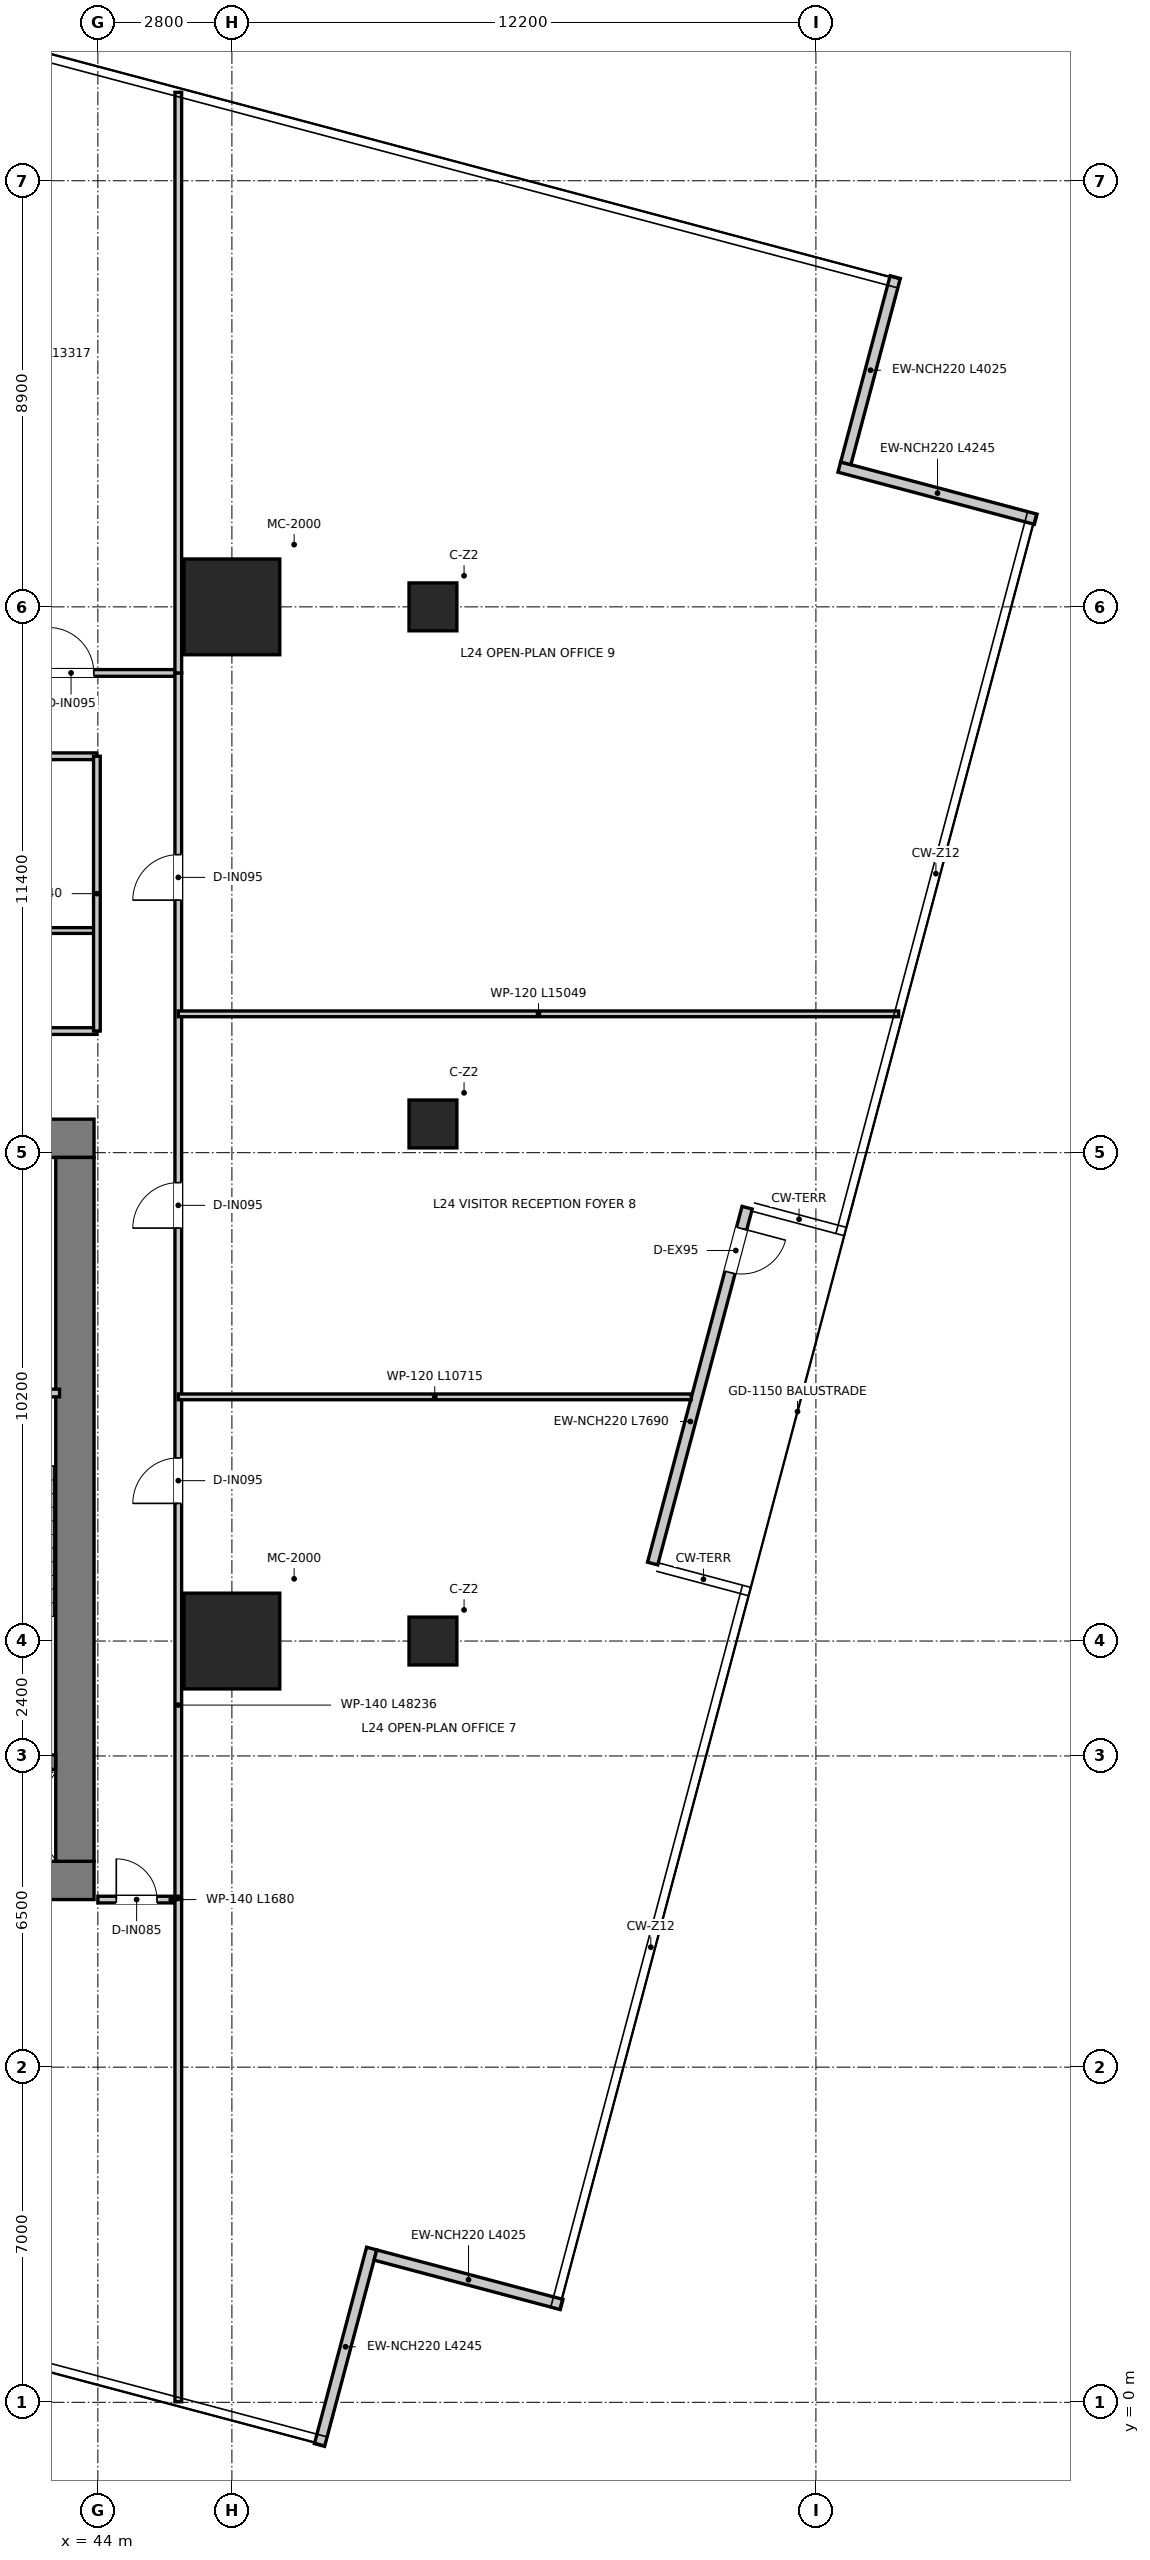
"""IFC4 building model, lengths in metres.
Left out: names, types, materials, properties, quantities, classifications, styles, units other than length and angle.
Written with IfcOpenShell. Run it as: python <this file> out.ifc"""

import sys

from ifc_helpers import new_model, si_unit, direction, frame, frame_2d, origin, origin_2d, place, context, subcontext, project, spatial, rectangle, extrude, source, transform, mapped, element, fill, save


model = new_model("IFC4")
c1 = context("Model", 3, precision=1e-05, world=origin(), true_north=direction((0.0, 1.0)))
c2 = subcontext(c1, "Body", "Model", "MODEL_VIEW")
j1 = project(units=[si_unit("LENGTHUNIT", "METRE"), si_unit("PLANEANGLEUNIT", "RADIAN")], contexts=[c1])
p1 = place(None, origin())
s1 = spatial("IfcSite", under=j1, at=p1, CompositionType="ELEMENT")
p2 = place(p1, origin())
s2 = spatial("IfcBuilding", under=s1, at=p2, CompositionType="ELEMENT")
p3 = place(p2, frame((0.0, 0.0, 101.9)))
s3 = spatial("IfcBuildingStorey", under=s2, at=p3, CompositionType="ELEMENT", Elevation=101.9)
p4 = place(p3, frame((28.08, 10.9, 0.0), z_axis=(0.0, 0.0, 1.0), x_axis=(1.0, 0.0, 0.0)))
e1 = element("IfcWall", 1, at=p4, inside=s3, PredefinedType="SHEAR", context=c2, shape_type="SweptSolid", body=[
    extrude(rectangle(XDim=15.84, YDim=0.8, at=frame_2d((7.92, 0.0))), origin(), (0.0, 0.0, 1.0), 3.95),
])
p5 = place(p3, frame((28.08, 26.4, 0.0), z_axis=(0.0, 0.0, 1.0), x_axis=(1.0, 0.0, 0.0)))
e2 = element("IfcWall", 2, at=p5, inside=s3, PredefinedType="SHEAR", context=c2, shape_type="SweptSolid", body=[
    extrude(rectangle(XDim=15.84, YDim=0.8, at=frame_2d((7.92, 0.0))), origin(), (0.0, 0.0, 1.0), 3.95),
])
p6 = place(p5, frame((7.22, 0.0, 0.0)))
e3 = element("IfcOpeningElement", 3, at=p6, cuts=e2, PredefinedType="OPENING", context=c2, shape_type="SweptSolid", body=[
    extrude(rectangle(XDim=1.4, YDim=2.2, at=frame_2d((0.7, 1.1))), frame((0.0, 0.41, 0.0), z_axis=(0.0, -1.0, 0.0), x_axis=(1.0, 0.0, 0.0)), (0.0, 0.0, 1.0), 0.82),
])
p7 = place(p5, frame((1.775, 0.0, 0.0)))
e4 = element("IfcOpeningElement", 4, at=p7, cuts=e2, PredefinedType="OPENING", context=c2, shape_type="SweptSolid", body=[
    extrude(rectangle(XDim=1.05, YDim=2.1, at=frame_2d((0.525, 1.05))), frame((0.0, 0.41, 0.0), z_axis=(0.0, -1.0, 0.0), x_axis=(1.0, 0.0, 0.0)), (0.0, 0.0, 1.0), 0.82),
])
p8 = place(p5, frame((13.015, 0.0, 0.0)))
e5 = element("IfcOpeningElement", 5, at=p8, cuts=e2, PredefinedType="OPENING", context=c2, shape_type="SweptSolid", body=[
    extrude(rectangle(XDim=1.05, YDim=2.1, at=frame_2d((0.525, 1.05))), frame((0.0, 0.41, 0.0), z_axis=(0.0, -1.0, 0.0), x_axis=(1.0, 0.0, 0.0)), (0.0, 0.0, 1.0), 0.82),
])
p9 = place(p3, frame((43.52, 11.3, 0.0), z_axis=(0.0, 0.0, 1.0), x_axis=(0.0, 1.0, 0.0)))
e6 = element("IfcWall", 6, at=p9, inside=s3, PredefinedType="SHEAR", context=c2, shape_type="SweptSolid", body=[
    extrude(rectangle(XDim=14.7, YDim=0.8, at=frame_2d((7.35, 0.0))), origin(), (0.0, 0.0, 1.0), 3.95),
])
p10 = place(p3, frame((40.02, 13.37, 0.0), z_axis=(0.0, 0.0, 1.0), x_axis=(1.0, 0.0, 0.0)))
e7 = element("IfcWall", 7, at=p10, inside=s3, PredefinedType="SHEAR", context=c2, shape_type="SweptSolid", body=[
    extrude(rectangle(XDim=3.1, YDim=0.3, at=frame_2d((1.55, 0.0))), origin(), (0.0, 0.0, 1.0), 3.95),
])
m1 = source(origin(), c2, "Body", "SweptSolid", [
    extrude(rectangle(XDim=2.0, YDim=2.0, at=origin_2d()), origin(), (0.0, 0.0, 1.0), 3.95),
])
for number, where, z_axis, x_axis in (
    (8, (46.8, 15.9, 0.0), (0.0, 0.0, 1.0), (1.0, 0.0, 0.0)),
    (9, (46.8, 37.5, 0.0), (0.0, 0.0, 1.0), (1.0, 0.0, 0.0)),
):
    element("IfcColumn", number, at=place(p3, frame(where, z_axis=z_axis, x_axis=x_axis)), inside=s3, PredefinedType="USERDEFINED", context=c2, shape_type="MappedRepresentation", body=[
        mapped(m1, transform((0.0, 0.0, 0.0), x_axis=(1.0, 0.0, 0.0), y_axis=(0.0, 1.0, 0.0), z_axis=(0.0, 0.0, 1.0), scale=1.0)),
    ])
m2 = source(origin(), c2, "Body", "SweptSolid", [
    extrude(rectangle(XDim=1.0, YDim=1.0, at=origin_2d()), origin(), (0.0, 0.0, 1.0), 3.95),
])
for number, where, z_axis, x_axis in (
    (10, (51.0, 37.5, 0.0), (0.0, 0.0, 1.0), (1.0, 0.0, 0.0)),
    (11, (51.0, 26.7, 0.0), (0.0, 0.0, 1.0), (1.0, 0.0, 0.0)),
    (12, (51.0, 15.9, 0.0), (0.0, 0.0, 1.0), (1.0, 0.0, 0.0)),
):
    element("IfcColumn", number, at=place(p3, frame(where, z_axis=z_axis, x_axis=x_axis)), inside=s3, PredefinedType="COLUMN", context=c2, shape_type="MappedRepresentation", body=[
        mapped(m2, transform((0.0, 0.0, 0.0), x_axis=(1.0, 0.0, 0.0), y_axis=(0.0, 1.0, 0.0), z_axis=(0.0, 0.0, 1.0), scale=1.0)),
    ])
p11 = place(p3, frame((48.63, -0.892, 0.0), z_axis=(0.0, 0.0, 1.0), x_axis=(0.256692391399, 0.966493153725, 0.0)))
e13 = element("IfcWall", 13, at=p11, inside=s3, PredefinedType="ELEMENTEDWALL", context=c2, shape_type="SweptSolid", body=[
    extrude(rectangle(XDim=4.245, YDim=0.22, at=frame_2d((2.123, 0.0))), origin(), (0.0, 0.0, 1.0), 3.67),
])
p12 = place(p3, frame((49.798, 3.076, 0.0), z_axis=(0.0, 0.0, 1.0), x_axis=(0.966492181189, -0.256696053144, 0.0)))
e14 = element("IfcWall", 14, at=p12, inside=s3, PredefinedType="ELEMENTEDWALL", context=c2, shape_type="SweptSolid", body=[
    extrude(rectangle(XDim=4.025, YDim=0.22, at=frame_2d((2.012, 0.0))), origin(), (0.0, 0.0, 1.0), 3.67),
])
p13 = place(p3, frame((57.563, 24.951, 0.0), z_axis=(0.0, 0.0, 1.0), x_axis=(-0.256717978083, -0.966486357756, 0.0)))
e15 = element("IfcWall", 15, at=p13, inside=s3, PredefinedType="ELEMENTEDWALL", context=c2, shape_type="SweptSolid", body=[
    extrude(rectangle(XDim=7.69, YDim=0.22, at=frame_2d((3.845, 0.0))), origin(), (0.0, 0.0, 1.0), 3.67),
])
p14 = place(p13, frame((0.45, 0.0, 0.0)))
e16 = element("IfcOpeningElement", 16, at=p14, cuts=e15, PredefinedType="OPENING", context=c2, shape_type="SweptSolid", body=[
    extrude(rectangle(XDim=0.95, YDim=2.1, at=frame_2d((0.475, 1.05))), frame((0.0, 0.12, 0.0), z_axis=(0.0, -1.0, 0.0), x_axis=(1.0, 0.0, 0.0)), (0.0, 0.0, 1.0), 0.24),
])
p15 = place(p3, frame((63.592, 39.33, 0.0), z_axis=(0.0, 0.0, 1.0), x_axis=(-0.966482674278, 0.256731845164, 0.0)))
e17 = element("IfcWall", 17, at=p15, inside=s3, PredefinedType="ELEMENTEDWALL", context=c2, shape_type="SweptSolid", body=[
    extrude(rectangle(XDim=4.245, YDim=0.22, at=frame_2d((2.123, 0.0))), origin(), (0.0, 0.0, 1.0), 3.67),
])
p16 = place(p3, frame((59.624, 40.498, 0.0), z_axis=(0.0, 0.0, 1.0), x_axis=(0.256696053144, 0.966492181189, 0.0)))
e18 = element("IfcWall", 18, at=p16, inside=s3, PredefinedType="ELEMENTEDWALL", context=c2, shape_type="SweptSolid", body=[
    extrude(rectangle(XDim=4.025, YDim=0.22, at=frame_2d((2.012, 0.0))), origin(), (0.0, 0.0, 1.0), 3.67),
])
p17 = place(p3, frame((40.04, 21.08, 0.0), z_axis=(0.0, 0.0, 1.0), x_axis=(1.0, 0.0, 0.0)))
e19 = element("IfcWall", 19, at=p17, inside=s3, PredefinedType="PARTITIONING", context=c2, shape_type="SweptSolid", body=[
    extrude(rectangle(XDim=3.16, YDim=0.16, at=frame_2d((1.58, 0.0))), origin(), (0.0, 0.0, 1.0), 3.67),
])
p18 = place(p17, frame((1.055, 0.0, 0.0)))
e20 = element("IfcOpeningElement", 20, at=p18, cuts=e19, PredefinedType="OPENING", context=c2, shape_type="SweptSolid", body=[
    extrude(rectangle(XDim=1.05, YDim=2.1, at=frame_2d((0.525, 1.05))), frame((0.0, 0.09, 0.0), z_axis=(0.0, -1.0, 0.0), x_axis=(1.0, 0.0, 0.0)), (0.0, 0.0, 1.0), 0.18),
])
p19 = place(p3, frame((28.02, 28.64, 0.0), z_axis=(0.0, 0.0, 1.0), x_axis=(1.0, 0.0, 0.0)))
e21 = element("IfcWall", 21, at=p19, inside=s3, PredefinedType="PARTITIONING", context=c2, shape_type="SweptSolid", body=[
    extrude(rectangle(XDim=15.96, YDim=0.14, at=frame_2d((7.98, 0.0))), origin(), (0.0, 0.0, 1.0), 3.08),
])
p20 = place(p19, frame((7.455, 0.0, 0.0)))
e22 = element("IfcOpeningElement", 22, at=p20, cuts=e21, PredefinedType="OPENING", context=c2, shape_type="SweptSolid", body=[
    extrude(rectangle(XDim=1.05, YDim=2.15, at=frame_2d((0.525, 1.075))), frame((0.0, 0.08, 0.0), z_axis=(0.0, -1.0, 0.0), x_axis=(1.0, 0.0, 0.0)), (0.0, 0.0, 1.0), 0.16),
])
p21 = place(p3, frame((28.02, 30.74, 0.0), z_axis=(0.0, 0.0, 1.0), x_axis=(1.0, 0.0, 0.0)))
e23 = element("IfcWall", 23, at=p21, inside=s3, PredefinedType="PARTITIONING", context=c2, shape_type="SweptSolid", body=[
    extrude(rectangle(XDim=15.96, YDim=0.12, at=frame_2d((7.98, 0.0))), origin(), (0.0, 0.0, 1.0), 3.08),
])
p22 = place(p3, frame((28.02, 34.38, 0.0), z_axis=(0.0, 0.0, 1.0), x_axis=(1.0, 0.0, 0.0)))
e24 = element("IfcWall", 24, at=p22, inside=s3, PredefinedType="PARTITIONING", context=c2, shape_type="SweptSolid", body=[
    extrude(rectangle(XDim=15.96, YDim=0.14, at=frame_2d((7.98, 0.0))), origin(), (0.0, 0.0, 1.0), 3.08),
])
p23 = place(p22, frame((1.13, 0.0, 0.0)))
e25 = element("IfcOpeningElement", 25, at=p23, cuts=e24, PredefinedType="OPENING", context=c2, shape_type="SweptSolid", body=[
    extrude(rectangle(XDim=0.9, YDim=2.1, at=frame_2d((0.45, 1.05))), frame((0.0, 0.08, 0.0), z_axis=(0.0, -1.0, 0.0), x_axis=(1.0, 0.0, 0.0)), (0.0, 0.0, 1.0), 0.16),
])
p24 = place(p22, frame((4.33, 0.0, 0.0)))
e26 = element("IfcOpeningElement", 26, at=p24, cuts=e24, PredefinedType="OPENING", context=c2, shape_type="SweptSolid", body=[
    extrude(rectangle(XDim=0.9, YDim=2.1, at=frame_2d((0.45, 1.05))), frame((0.0, 0.08, 0.0), z_axis=(0.0, -1.0, 0.0), x_axis=(1.0, 0.0, 0.0)), (0.0, 0.0, 1.0), 0.16),
])
p25 = place(p22, frame((7.355, 0.0, 0.0)))
e27 = element("IfcOpeningElement", 27, at=p25, cuts=e24, PredefinedType="OPENING", context=c2, shape_type="SweptSolid", body=[
    extrude(rectangle(XDim=0.95, YDim=2.1, at=frame_2d((0.475, 1.05))), frame((0.0, 0.08, 0.0), z_axis=(0.0, -1.0, 0.0), x_axis=(1.0, 0.0, 0.0)), (0.0, 0.0, 1.0), 0.16),
])
p26 = place(p22, frame((12.23, 0.0, 0.0)))
e28 = element("IfcOpeningElement", 28, at=p26, cuts=e24, PredefinedType="OPENING", context=c2, shape_type="SweptSolid", body=[
    extrude(rectangle(XDim=0.95, YDim=2.1, at=frame_2d((0.475, 1.05))), frame((0.0, 0.08, 0.0), z_axis=(0.0, -1.0, 0.0), x_axis=(1.0, 0.0, 0.0)), (0.0, 0.0, 1.0), 0.16),
])
p27 = place(p3, frame((43.98, 28.64, 0.0), z_axis=(0.0, 0.0, 1.0), x_axis=(0.0, 1.0, 0.0)))
e29 = element("IfcWall", 29, at=p27, inside=s3, PredefinedType="PARTITIONING", context=c2, shape_type="SweptSolid", body=[
    extrude(rectangle(XDim=5.74, YDim=0.14, at=frame_2d((2.87, 0.0))), origin(), (0.0, 0.0, 1.0), 3.27),
])
p28 = place(p3, frame((26.32, 36.12, 0.0), z_axis=(0.0, 0.0, 1.0), x_axis=(1.0, 0.0, 0.0)))
e30 = element("IfcWall", 30, at=p28, inside=s3, PredefinedType="PARTITIONING", context=c2, shape_type="SweptSolid", body=[
    extrude(rectangle(XDim=19.36, YDim=0.14, at=frame_2d((9.68, 0.0))), origin(), (0.0, 0.0, 1.0), 3.08),
])
p29 = place(p28, frame((1.265, 0.0, 0.0)))
e31 = element("IfcOpeningElement", 31, at=p29, cuts=e30, PredefinedType="OPENING", context=c2, shape_type="SweptSolid", body=[
    extrude(rectangle(XDim=0.95, YDim=2.1, at=frame_2d((0.475, 1.05))), frame((0.0, 0.08, 0.0), z_axis=(0.0, -1.0, 0.0), x_axis=(1.0, 0.0, 0.0)), (0.0, 0.0, 1.0), 0.16),
])
p30 = place(p28, frame((5.855, 0.0, 0.0)))
e32 = element("IfcOpeningElement", 32, at=p30, cuts=e30, PredefinedType="OPENING", context=c2, shape_type="SweptSolid", body=[
    extrude(rectangle(XDim=0.95, YDim=2.1, at=frame_2d((0.475, 1.05))), frame((0.0, 0.08, 0.0), z_axis=(0.0, -1.0, 0.0), x_axis=(1.0, 0.0, 0.0)), (0.0, 0.0, 1.0), 0.16),
])
p31 = place(p28, frame((11.555, 0.0, 0.0)))
e33 = element("IfcOpeningElement", 33, at=p31, cuts=e30, PredefinedType="OPENING", context=c2, shape_type="SweptSolid", body=[
    extrude(rectangle(XDim=0.95, YDim=2.1, at=frame_2d((0.475, 1.05))), frame((0.0, 0.08, 0.0), z_axis=(0.0, -1.0, 0.0), x_axis=(1.0, 0.0, 0.0)), (0.0, 0.0, 1.0), 0.16),
])
p32 = place(p28, frame((16.645, 0.0, 0.0)))
e34 = element("IfcOpeningElement", 34, at=p32, cuts=e30, PredefinedType="OPENING", context=c2, shape_type="SweptSolid", body=[
    extrude(rectangle(XDim=0.95, YDim=2.1, at=frame_2d((0.475, 1.05))), frame((0.0, 0.08, 0.0), z_axis=(0.0, -1.0, 0.0), x_axis=(1.0, 0.0, 0.0)), (0.0, 0.0, 1.0), 0.16),
])
p33 = place(p3, frame((45.68, 10.5, 0.0), z_axis=(0.0, 0.0, 1.0), x_axis=(0.0, 1.0, 0.0)))
e35 = element("IfcWall", 35, at=p33, inside=s3, PredefinedType="PARTITIONING", context=c2, shape_type="SweptSolid", body=[
    extrude(rectangle(XDim=25.62, YDim=0.14, at=frame_2d((12.81, 0.0))), origin(), (0.0, 0.0, 1.0), 2.97),
])
p34 = place(p33, frame((8.275, 0.0, 0.0)))
e36 = element("IfcOpeningElement", 36, at=p34, cuts=e35, PredefinedType="OPENING", context=c2, shape_type="SweptSolid", body=[
    extrude(rectangle(XDim=0.95, YDim=2.1, at=frame_2d((0.475, 1.05))), frame((0.0, 0.08, 0.0), z_axis=(0.0, -1.0, 0.0), x_axis=(1.0, 0.0, 0.0)), (0.0, 0.0, 1.0), 0.16),
])
p35 = place(p33, frame((14.025, 0.0, 0.0)))
e37 = element("IfcOpeningElement", 37, at=p35, cuts=e35, PredefinedType="OPENING", context=c2, shape_type="SweptSolid", body=[
    extrude(rectangle(XDim=0.95, YDim=2.1, at=frame_2d((0.475, 1.05))), frame((0.0, 0.08, 0.0), z_axis=(0.0, -1.0, 0.0), x_axis=(1.0, 0.0, 0.0)), (0.0, 0.0, 1.0), 0.16),
])
p36 = place(p33, frame((20.875, 0.0, 0.0)))
e38 = element("IfcOpeningElement", 38, at=p36, cuts=e35, PredefinedType="OPENING", context=c2, shape_type="SweptSolid", body=[
    extrude(rectangle(XDim=0.95, YDim=2.1, at=frame_2d((0.475, 1.05))), frame((0.0, 0.08, 0.0), z_axis=(0.0, -1.0, 0.0), x_axis=(1.0, 0.0, 0.0)), (0.0, 0.0, 1.0), 0.16),
])
p37 = place(p3, frame((44.0, 10.5, 0.0), z_axis=(0.0, 0.0, 1.0), x_axis=(1.0, 0.0, 0.0)))
e39 = element("IfcWall", 39, at=p37, inside=s3, PredefinedType="PARTITIONING", context=c2, shape_type="SweptSolid", body=[
    extrude(rectangle(XDim=1.68, YDim=0.14, at=frame_2d((0.84, 0.0))), origin(), (0.0, 0.0, 1.0), 3.67),
])
p38 = place(p37, frame((0.385, 0.0, 0.0)))
e40 = element("IfcOpeningElement", 40, at=p38, cuts=e39, PredefinedType="OPENING", context=c2, shape_type="SweptSolid", body=[
    extrude(rectangle(XDim=0.85, YDim=2.1, at=frame_2d((0.425, 1.05))), frame((0.0, 0.08, 0.0), z_axis=(0.0, -1.0, 0.0), x_axis=(1.0, 0.0, 0.0)), (0.0, 0.0, 1.0), 0.16),
])
p39 = place(p3, frame((45.68, 36.12, 0.0), z_axis=(0.0, 0.0, 1.0), x_axis=(0.0, 1.0, 0.0)))
e41 = element("IfcWall", 41, at=p39, inside=s3, PredefinedType="PARTITIONING", context=c2, shape_type="SweptSolid", body=[
    extrude(rectangle(XDim=12.127, YDim=0.14, at=frame_2d((6.063, 0.0))), origin(), (0.0, 0.0, 1.0), 2.97),
])
p40 = place(p3, frame((45.68, 0.01, 0.0), z_axis=(0.0, 0.0, 1.0), x_axis=(0.0, 1.0, 0.0)))
e42 = element("IfcWall", 42, at=p40, inside=s3, PredefinedType="PARTITIONING", context=c2, shape_type="SweptSolid", body=[
    extrude(rectangle(XDim=10.49, YDim=0.14, at=frame_2d((5.245, 0.0))), origin(), (0.0, 0.0, 1.0), 3.67),
])
p41 = place(p3, frame((45.68, 21.0, 0.0), z_axis=(0.0, 0.0, 1.0), x_axis=(1.0, 0.0, 0.0)))
e43 = element("IfcWall", 43, at=p41, inside=s3, PredefinedType="PARTITIONING", context=c2, shape_type="SweptSolid", body=[
    extrude(rectangle(XDim=10.715, YDim=0.12, at=frame_2d((5.358, 0.0))), origin(), (0.0, 0.0, 1.0), 2.97),
])
p42 = place(p3, frame((45.68, 29.0, 0.0), z_axis=(0.0, 0.0, 1.0), x_axis=(1.0, 0.0, 0.0)))
e44 = element("IfcWall", 44, at=p42, inside=s3, PredefinedType="PARTITIONING", context=c2, shape_type="SweptSolid", body=[
    extrude(rectangle(XDim=15.049, YDim=0.12, at=frame_2d((7.525, 0.0))), origin(), (0.0, 0.0, 1.0), 2.97),
])
p43 = place(p32, origin())
e45 = element("IfcDoor", 45, at=p43, inside=s3, OperationType="SINGLE_SWING_LEFT", PredefinedType="DOOR", context=c2, shape_type="SweptSolid", body=[
    extrude(rectangle(XDim=0.95, YDim=2.1, at=frame_2d((0.475, 1.05))), frame((0.0, 0.025, 0.0), z_axis=(0.0, -1.0, 0.0), x_axis=(1.0, 0.0, 0.0)), (0.0, 0.0, 1.0), 0.05),
])
fill(e34, e45)
p44 = place(p34, origin())
e46 = element("IfcDoor", 46, at=p44, inside=s3, OperationType="SINGLE_SWING_LEFT", PredefinedType="DOOR", context=c2, shape_type="SweptSolid", body=[
    extrude(rectangle(XDim=0.95, YDim=2.1, at=frame_2d((0.475, 1.05))), frame((0.0, 0.025, 0.0), z_axis=(0.0, -1.0, 0.0), x_axis=(1.0, 0.0, 0.0)), (0.0, 0.0, 1.0), 0.05),
])
fill(e36, e46)
p45 = place(p35, origin())
e47 = element("IfcDoor", 47, at=p45, inside=s3, OperationType="SINGLE_SWING_LEFT", PredefinedType="DOOR", context=c2, shape_type="SweptSolid", body=[
    extrude(rectangle(XDim=0.95, YDim=2.1, at=frame_2d((0.475, 1.05))), frame((0.0, 0.025, 0.0), z_axis=(0.0, -1.0, 0.0), x_axis=(1.0, 0.0, 0.0)), (0.0, 0.0, 1.0), 0.05),
])
fill(e37, e47)
p46 = place(p36, origin())
e48 = element("IfcDoor", 48, at=p46, inside=s3, OperationType="SINGLE_SWING_LEFT", PredefinedType="DOOR", context=c2, shape_type="SweptSolid", body=[
    extrude(rectangle(XDim=0.95, YDim=2.1, at=frame_2d((0.475, 1.05))), frame((0.0, 0.025, 0.0), z_axis=(0.0, -1.0, 0.0), x_axis=(1.0, 0.0, 0.0)), (0.0, 0.0, 1.0), 0.05),
])
fill(e38, e48)
p47 = place(p38, origin())
e49 = element("IfcDoor", 49, at=p47, inside=s3, OperationType="SINGLE_SWING_LEFT", PredefinedType="DOOR", context=c2, shape_type="SweptSolid", body=[
    extrude(rectangle(XDim=0.85, YDim=2.1, at=frame_2d((0.425, 1.05))), frame((0.0, 0.025, 0.0), z_axis=(0.0, -1.0, 0.0), x_axis=(1.0, 0.0, 0.0)), (0.0, 0.0, 1.0), 0.05),
])
fill(e40, e49)
p48 = place(p14, origin())
e50 = element("IfcDoor", 50, at=p48, inside=s3, OperationType="SINGLE_SWING_LEFT", PredefinedType="DOOR", context=c2, shape_type="SweptSolid", body=[
    extrude(rectangle(XDim=0.95, YDim=2.1, at=frame_2d((0.475, 1.05))), frame((0.0, 0.025, 0.0), z_axis=(0.0, -1.0, 0.0), x_axis=(1.0, 0.0, 0.0)), (0.0, 0.0, 1.0), 0.05),
])
fill(e16, e50)
save(model, sys.argv[1])
